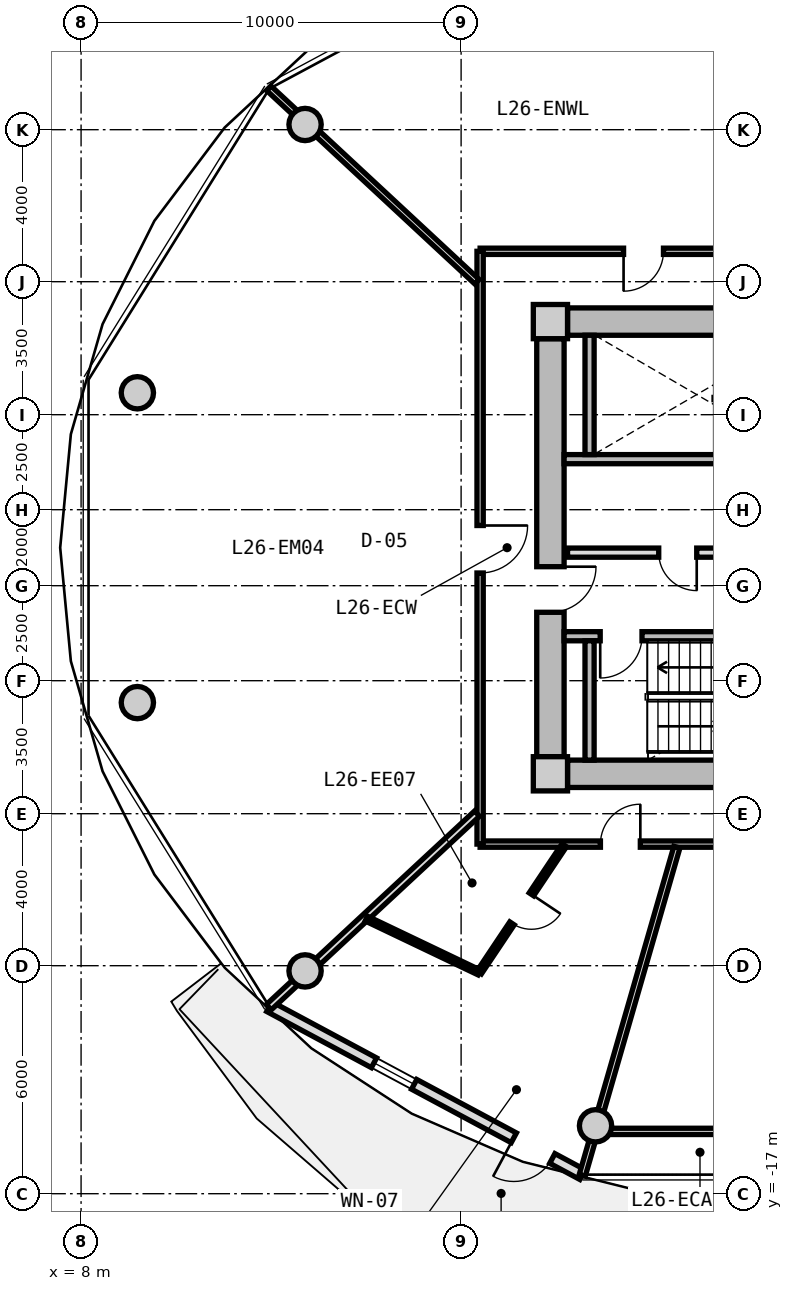
"""IFC4 building model, lengths in metres.
Left out: names, types, materials, properties, quantities, classifications, styles, units other than length and angle.
Written with IfcOpenShell. Run it as: python <this file> out.ifc"""

import sys

from ifc_helpers import new_model, si_unit, direction, frame, frame_2d, origin, origin_2d, place, context, subcontext, project, spatial, rectangle, circle, extrude, source, transform, mapped, element, fill, save


model = new_model("IFC4")
c1 = context("Model", 3, precision=1e-05, world=origin(), true_north=direction((0.0, 1.0)))
c2 = subcontext(c1, "Body", "Model", "MODEL_VIEW")
j1 = project(units=[si_unit("LENGTHUNIT", "METRE"), si_unit("PLANEANGLEUNIT", "RADIAN")], contexts=[c1])
p1 = place(None, origin())
s1 = spatial("IfcSite", under=j1, at=p1, CompositionType="ELEMENT")
p2 = place(p1, origin())
s2 = spatial("IfcBuilding", under=s1, at=p2, CompositionType="ELEMENT")
p3 = place(p2, frame((0.0, 0.0, 87.1)))
s3 = spatial("IfcBuildingStorey", under=s2, at=p3, CompositionType="ELEMENT", Elevation=87.1)
m1 = source(origin(), c2, "Body", "SweptSolid", [
    extrude(rectangle(XDim=0.9, YDim=0.9, at=origin_2d()), origin(), (0.0, 0.0, 1.0), 3.05),
])
for number, where, z_axis, x_axis in (
    (1, (20.35, -5.95, 0.0), (0.0, 0.0, 1.0), (1.0, 0.0, 0.0)),
    (2, (20.35, 5.95, 0.0), (0.0, 0.0, 1.0), (1.0, 0.0, 0.0)),
):
    element("IfcColumn", number, at=place(p3, frame(where, z_axis=z_axis, x_axis=x_axis)), inside=s3, PredefinedType="COLUMN", context=c2, shape_type="MappedRepresentation", body=[
        mapped(m1, transform((0.0, 0.0, 0.0), x_axis=(1.0, 0.0, 0.0), y_axis=(0.0, 1.0, 0.0), z_axis=(0.0, 0.0, 1.0), scale=1.0)),
    ])
m2 = source(origin(), c2, "Body", "SweptSolid", [
    extrude(rectangle(XDim=14.4, YDim=0.72, at=frame_2d((7.2, 0.0))), origin(), (0.0, 0.0, 1.0), 2.79),
])
for number, where, z_axis, x_axis in (
    (3, (20.8, 5.95, 0.0), (0.0, 0.0, 1.0), (1.0, 0.0, 0.0)),
    (4, (35.2, -5.95, 0.0), (0.0, 0.0, 1.0), (-1.0, 0.0, 0.0)),
):
    element("IfcWall", number, at=place(p3, frame(where, z_axis=z_axis, x_axis=x_axis)), inside=s3, PredefinedType="SHEAR", context=c2, shape_type="MappedRepresentation", body=[
        mapped(m2, transform((0.0, 0.0, 0.0), x_axis=(1.0, 0.0, 0.0), y_axis=(0.0, 1.0, 0.0), z_axis=(0.0, 0.0, 1.0), scale=1.0)),
    ])
m3 = source(origin(), c2, "Body", "SweptSolid", [
    extrude(rectangle(XDim=11.0, YDim=0.72, at=frame_2d((5.5, 0.0))), origin(), (0.0, 0.0, 1.0), 2.79),
])
p4 = place(p3, frame((20.35, -5.5, 0.0), z_axis=(0.0, 0.0, 1.0), x_axis=(0.0, 1.0, 0.0)))
e5 = element("IfcWall", 5, at=p4, inside=s3, PredefinedType="SHEAR", context=c2, shape_type="MappedRepresentation", body=[
    mapped(m3, transform((0.0, 0.0, 0.0), x_axis=(1.0, 0.0, 0.0), y_axis=(0.0, 1.0, 0.0), z_axis=(0.0, 0.0, 1.0), scale=1.0)),
])
p5 = place(p4, frame((3.8, 0.0, 0.0)))
e6 = element("IfcOpeningElement", 6, at=p5, cuts=e5, PredefinedType="OPENING", context=c2, shape_type="SweptSolid", body=[
    extrude(rectangle(XDim=1.2, YDim=2.15, at=frame_2d((0.6, 1.075))), frame((0.0, 0.37, 0.0), z_axis=(0.0, -1.0, 0.0), x_axis=(1.0, 0.0, 0.0)), (0.0, 0.0, 1.0), 0.74),
])
m4 = source(origin(), c2, "Body", "SweptSolid", [
    extrude(circle(Radius=0.425, at=origin_2d()), origin(), (0.0, 0.0, 1.0), 3.05),
])
for number, where, z_axis, x_axis in (
    (7, (13.894, 11.137, 0.0), (0.0, 0.0, 1.0), (1.0, 0.0, 0.0)),
    (8, (9.481, 4.076, 0.0), (0.0, 0.0, 1.0), (1.0, 0.0, 0.0)),
    (9, (9.481, -4.076, 0.0), (0.0, 0.0, 1.0), (1.0, 0.0, 0.0)),
    (10, (13.894, -11.137, 0.0), (0.0, 0.0, 1.0), (1.0, 0.0, 0.0)),
    (11, (21.537, -15.213, 0.0), (0.0, 0.0, 1.0), (1.0, 0.0, 0.0)),
):
    element("IfcColumn", number, at=place(p3, frame(where, z_axis=z_axis, x_axis=x_axis)), inside=s3, PredefinedType="COLUMN", context=c2, shape_type="MappedRepresentation", body=[
        mapped(m4, transform((0.0, 0.0, 0.0), x_axis=(1.0, 0.0, 0.0), y_axis=(0.0, 1.0, 0.0), z_axis=(0.0, 0.0, 1.0), scale=1.0)),
    ])
m5 = source(origin(), c2, "Body", "SweptSolid", [
    extrude(rectangle(XDim=9.351, YDim=0.29, at=frame_2d((4.675, 0.0))), origin(), (0.0, 0.0, 1.0), 2.79),
])
p6 = place(p3, frame((21.193, -16.498, 0.0), z_axis=(0.0, 0.0, 1.0), x_axis=(-0.881184411073, 0.472772708267, 0.0)))
e12 = element("IfcWall", 12, at=p6, inside=s3, PredefinedType="SOLIDWALL", context=c2, shape_type="MappedRepresentation", body=[
    mapped(m5, transform((0.0, 0.0, 0.0), x_axis=(1.0, 0.0, 0.0), y_axis=(0.0, 1.0, 0.0), z_axis=(0.0, 0.0, 1.0), scale=1.0)),
])
p7 = place(p6, frame((0.9, 0.0, 0.0)))
e13 = element("IfcOpeningElement", 13, at=p7, cuts=e12, PredefinedType="OPENING", context=c2, shape_type="SweptSolid", body=[
    extrude(rectangle(XDim=1.15, YDim=2.25, at=frame_2d((0.575, 1.125))), frame((0.0, 0.155, 0.0), z_axis=(0.0, -1.0, 0.0), x_axis=(1.0, 0.0, 0.0)), (0.0, 0.0, 1.0), 0.31),
])
p8 = place(p6, frame((5.025, 0.0, 0.85)))
e14 = element("IfcOpeningElement", 14, at=p8, cuts=e12, PredefinedType="OPENING", context=c2, shape_type="SweptSolid", body=[
    extrude(rectangle(XDim=1.2, YDim=1.5, at=frame_2d((0.6, 0.75))), frame((0.0, 0.155, 0.0), z_axis=(0.0, -1.0, 0.0), x_axis=(1.0, 0.0, 0.0)), (0.0, 0.0, 1.0), 0.31),
])
m6 = source(origin(), c2, "Body", "SweptSolid", [
    extrude(rectangle(XDim=7.83, YDim=0.24, at=frame_2d((3.915, 0.0))), origin(), (0.0, 0.0, 1.0), 2.79),
])
p9 = place(p3, frame((20.71, 2.33, 0.0), z_axis=(0.0, 0.0, 1.0), x_axis=(1.0, 0.0, 0.0)))
e15 = element("IfcWall", 15, at=p9, inside=s3, PredefinedType="PARTITIONING", context=c2, shape_type="MappedRepresentation", body=[
    mapped(m6, transform((0.0, 0.0, 0.0), x_axis=(1.0, 0.0, 0.0), y_axis=(0.0, 1.0, 0.0), z_axis=(0.0, 0.0, 1.0), scale=1.0)),
])
m7 = source(origin(), c2, "Body", "SweptSolid", [
    extrude(rectangle(XDim=3.14, YDim=0.24, at=frame_2d((1.57, 0.0))), origin(), (0.0, 0.0, 1.0), 2.79),
])
p10 = place(p3, frame((21.38, 2.45, 0.0), z_axis=(0.0, 0.0, 1.0), x_axis=(0.0, 1.0, 0.0)))
e16 = element("IfcWall", 16, at=p10, inside=s3, PredefinedType="PARTITIONING", context=c2, shape_type="MappedRepresentation", body=[
    mapped(m7, transform((0.0, 0.0, 0.0), x_axis=(1.0, 0.0, 0.0), y_axis=(0.0, 1.0, 0.0), z_axis=(0.0, 0.0, 1.0), scale=1.0)),
])
p11 = place(p3, frame((20.71, -2.33, 0.0), z_axis=(0.0, 0.0, 1.0), x_axis=(1.0, 0.0, 0.0)))
e17 = element("IfcWall", 17, at=p11, inside=s3, PredefinedType="PARTITIONING", context=c2, shape_type="MappedRepresentation", body=[
    mapped(m6, transform((0.0, 0.0, 0.0), x_axis=(1.0, 0.0, 0.0), y_axis=(0.0, 1.0, 0.0), z_axis=(0.0, 0.0, 1.0), scale=1.0)),
])
p12 = place(p11, frame((0.95, 0.0, 0.0)))
e18 = element("IfcOpeningElement", 18, at=p12, cuts=e17, PredefinedType="OPENING", context=c2, shape_type="SweptSolid", body=[
    extrude(rectangle(XDim=1.1, YDim=2.15, at=frame_2d((0.55, 1.075))), frame((0.0, 0.13, 0.0), z_axis=(0.0, -1.0, 0.0), x_axis=(1.0, 0.0, 0.0)), (0.0, 0.0, 1.0), 0.26),
])
p13 = place(p3, frame((21.38, -5.59, 0.0), z_axis=(0.0, 0.0, 1.0), x_axis=(0.0, 1.0, 0.0)))
e19 = element("IfcWall", 19, at=p13, inside=s3, PredefinedType="PARTITIONING", context=c2, shape_type="MappedRepresentation", body=[
    mapped(m7, transform((0.0, 0.0, 0.0), x_axis=(1.0, 0.0, 0.0), y_axis=(0.0, 1.0, 0.0), z_axis=(0.0, 0.0, 1.0), scale=1.0)),
])
m8 = source(origin(), c2, "Body", "SweptSolid", [
    extrude(rectangle(XDim=7.62, YDim=0.24, at=frame_2d((3.81, 0.0))), origin(), (0.0, 0.0, 1.0), 2.775),
])
p14 = place(p3, frame((20.8, -0.13, 0.0), z_axis=(0.0, 0.0, 1.0), x_axis=(1.0, 0.0, 0.0)))
e20 = element("IfcWall", 20, at=p14, inside=s3, PredefinedType="PARTITIONING", context=c2, shape_type="MappedRepresentation", body=[
    mapped(m8, transform((0.0, 0.0, 0.0), x_axis=(1.0, 0.0, 0.0), y_axis=(0.0, 1.0, 0.0), z_axis=(0.0, 0.0, 1.0), scale=1.0)),
])
p15 = place(p14, frame((6.22, 0.0, 0.0)))
e21 = element("IfcOpeningElement", 21, at=p15, cuts=e20, PredefinedType="OPENING", context=c2, shape_type="SweptSolid", body=[
    extrude(rectangle(XDim=1.0, YDim=2.1, at=frame_2d((0.5, 1.05))), frame((0.0, 0.13, 0.0), z_axis=(0.0, -1.0, 0.0), x_axis=(1.0, 0.0, 0.0)), (0.0, 0.0, 1.0), 0.26),
])
p16 = place(p14, frame((2.4, 0.0, 0.0)))
e22 = element("IfcOpeningElement", 22, at=p16, cuts=e20, PredefinedType="OPENING", context=c2, shape_type="SweptSolid", body=[
    extrude(rectangle(XDim=1.0, YDim=2.1, at=frame_2d((0.5, 1.05))), frame((0.0, 0.13, 0.0), z_axis=(0.0, -1.0, 0.0), x_axis=(1.0, 0.0, 0.0)), (0.0, 0.0, 1.0), 0.26),
])
m9 = source(origin(), c2, "Body", "SweptSolid", [
    extrude(rectangle(XDim=8.6, YDim=0.165, at=frame_2d((4.3, 0.0))), origin(), (0.0, 0.0, 1.0), 2.775),
])
p17 = place(p3, frame((18.5, 7.8, 0.0), z_axis=(0.0, 0.0, 1.0), x_axis=(1.0, 0.0, 0.0)))
e23 = element("IfcWall", 23, at=p17, inside=s3, PredefinedType="PARTITIONING", context=c2, shape_type="MappedRepresentation", body=[
    mapped(m9, transform((0.0, 0.0, 0.0), x_axis=(1.0, 0.0, 0.0), y_axis=(0.0, 1.0, 0.0), z_axis=(0.0, 0.0, 1.0), scale=1.0)),
])
p18 = place(p17, frame((3.775, 0.0, 0.0)))
e24 = element("IfcOpeningElement", 24, at=p18, cuts=e23, PredefinedType="OPENING", context=c2, shape_type="SweptSolid", body=[
    extrude(rectangle(XDim=1.05, YDim=2.15, at=frame_2d((0.525, 1.075))), frame((0.0, 0.093, 0.0), z_axis=(0.0, -1.0, 0.0), x_axis=(1.0, 0.0, 0.0)), (0.0, 0.0, 1.0), 0.185),
])
p19 = place(p3, frame((27.1, -7.8, 0.0), z_axis=(0.0, 0.0, 1.0), x_axis=(-1.0, 0.0, 0.0)))
e25 = element("IfcWall", 25, at=p19, inside=s3, PredefinedType="PARTITIONING", context=c2, shape_type="MappedRepresentation", body=[
    mapped(m9, transform((0.0, 0.0, 0.0), x_axis=(1.0, 0.0, 0.0), y_axis=(0.0, 1.0, 0.0), z_axis=(0.0, 0.0, 1.0), scale=1.0)),
])
p20 = place(p19, frame((4.384, 0.0, 0.0)))
e26 = element("IfcOpeningElement", 26, at=p20, cuts=e25, PredefinedType="OPENING", context=c2, shape_type="SweptSolid", body=[
    extrude(rectangle(XDim=1.05, YDim=2.15, at=frame_2d((0.525, 1.075))), frame((0.0, 0.093, 0.0), z_axis=(0.0, -1.0, 0.0), x_axis=(1.0, 0.0, 0.0)), (0.0, 0.0, 1.0), 0.185),
])
m10 = source(origin(), c2, "Body", "SweptSolid", [
    extrude(rectangle(XDim=15.6, YDim=0.165, at=frame_2d((7.8, 0.0))), origin(), (0.0, 0.0, 1.0), 2.775),
])
p21 = place(p3, frame((18.5, -7.8, 0.0), z_axis=(0.0, 0.0, 1.0), x_axis=(0.0, 1.0, 0.0)))
e27 = element("IfcWall", 27, at=p21, inside=s3, PredefinedType="PARTITIONING", context=c2, shape_type="MappedRepresentation", body=[
    mapped(m10, transform((0.0, 0.0, 0.0), x_axis=(1.0, 0.0, 0.0), y_axis=(0.0, 1.0, 0.0), z_axis=(0.0, 0.0, 1.0), scale=1.0)),
])
p22 = place(p21, frame((7.134, 0.0, 0.0)))
e28 = element("IfcOpeningElement", 28, at=p22, cuts=e27, PredefinedType="OPENING", context=c2, shape_type="SweptSolid", body=[
    extrude(rectangle(XDim=1.25, YDim=2.2, at=frame_2d((0.625, 1.1))), frame((0.0, 0.093, 0.0), z_axis=(0.0, -1.0, 0.0), x_axis=(1.0, 0.0, 0.0)), (0.0, 0.0, 1.0), 0.185),
])
m11 = source(origin(), c2, "Body", "SweptSolid", [
    extrude(rectangle(XDim=7.482, YDim=0.165, at=frame_2d((3.741, 0.0))), origin(), (0.0, 0.0, 1.0), 2.275),
])
p23 = place(p3, frame((18.42, 6.998, 0.0), z_axis=(0.0, 0.0, 1.0), x_axis=(-0.732508698043, 0.680757671489, 0.0)))
e29 = element("IfcWall", 29, at=p23, inside=s3, PredefinedType="PARTITIONING", context=c2, shape_type="MappedRepresentation", body=[
    mapped(m11, transform((0.0, 0.0, 0.0), x_axis=(1.0, 0.0, 0.0), y_axis=(0.0, 1.0, 0.0), z_axis=(0.0, 0.0, 1.0), scale=1.0)),
])
m12 = source(origin(), c2, "Body", "SweptSolid", [
    extrude(rectangle(XDim=8.989, YDim=0.165, at=frame_2d((4.495, 0.0))), origin(), (0.0, 0.0, 1.0), 2.275),
])
p24 = place(p3, frame((23.678, -7.88, 0.0), z_axis=(0.0, 0.0, 1.0), x_axis=(-0.27702323008, -0.960863221274, 0.0)))
e30 = element("IfcWall", 30, at=p24, inside=s3, PredefinedType="PARTITIONING", context=c2, shape_type="MappedRepresentation", body=[
    mapped(m12, transform((0.0, 0.0, 0.0), x_axis=(1.0, 0.0, 0.0), y_axis=(0.0, 1.0, 0.0), z_axis=(0.0, 0.0, 1.0), scale=1.0)),
])
m13 = source(origin(), c2, "Body", "SweptSolid", [
    extrude(rectangle(XDim=5.814, YDim=0.165, at=frame_2d((2.907, 0.0))), origin(), (0.0, 0.0, 1.0), 2.275),
])
p25 = place(p3, frame((21.366, -15.36, 0.0), z_axis=(0.0, 0.0, 1.0), x_axis=(1.0, 0.0, 0.0)))
e31 = element("IfcWall", 31, at=p25, inside=s3, PredefinedType="PARTITIONING", context=c2, shape_type="MappedRepresentation", body=[
    mapped(m13, transform((0.0, 0.0, 0.0), x_axis=(1.0, 0.0, 0.0), y_axis=(0.0, 1.0, 0.0), z_axis=(0.0, 0.0, 1.0), scale=1.0)),
])
m14 = source(origin(), c2, "Body", "SweptSolid", [
    extrude(rectangle(XDim=7.482, YDim=0.19, at=frame_2d((3.741, 0.0))), origin(), (0.0, 0.0, 1.0), 2.275),
])
p26 = place(p3, frame((18.42, -6.998, 0.0), z_axis=(0.0, 0.0, 1.0), x_axis=(-0.732508698043, -0.680757671489, 0.0)))
e32 = element("IfcWall", 32, at=p26, inside=s3, PredefinedType="PARTITIONING", context=c2, shape_type="MappedRepresentation", body=[
    mapped(m14, transform((0.0, 0.0, 0.0), x_axis=(1.0, 0.0, 0.0), y_axis=(0.0, 1.0, 0.0), z_axis=(0.0, 0.0, 1.0), scale=1.0)),
])
m15 = source(origin(), c2, "Body", "SweptSolid", [
    extrude(rectangle(XDim=4.027, YDim=0.14, at=frame_2d((2.014, 0.0))), origin(), (0.0, 0.0, 1.0), 2.775),
])
p27 = place(p3, frame((20.714, -7.83, 0.0), z_axis=(0.0, 0.0, 1.0), x_axis=(-0.555832825922, -0.831294093343, 0.0)))
e33 = element("IfcWall", 33, at=p27, inside=s3, PredefinedType="PARTITIONING", context=c2, shape_type="MappedRepresentation", body=[
    mapped(m15, transform((0.0, 0.0, 0.0), x_axis=(1.0, 0.0, 0.0), y_axis=(0.0, 1.0, 0.0), z_axis=(0.0, 0.0, 1.0), scale=1.0)),
])
p28 = place(p27, frame((1.554, 0.0, 0.0)))
e34 = element("IfcOpeningElement", 34, at=p28, cuts=e33, PredefinedType="OPENING", context=c2, shape_type="SweptSolid", body=[
    extrude(rectangle(XDim=0.92, YDim=2.1, at=frame_2d((0.46, 1.05))), frame((0.0, 0.08, 0.0), z_axis=(0.0, -1.0, 0.0), x_axis=(1.0, 0.0, 0.0)), (0.0, 0.0, 1.0), 0.16),
])
m16 = source(origin(), c2, "Body", "SweptSolid", [
    extrude(rectangle(XDim=3.291, YDim=0.14, at=frame_2d((1.646, 0.0))), origin(), (0.0, 0.0, 1.0), 2.775),
])
p29 = place(p3, frame((18.476, -11.178, 0.0), z_axis=(0.0, 0.0, 1.0), x_axis=(-0.902381393443, 0.430938302739, 0.0)))
e35 = element("IfcWall", 35, at=p29, inside=s3, PredefinedType="PARTITIONING", context=c2, shape_type="MappedRepresentation", body=[
    mapped(m16, transform((0.0, 0.0, 0.0), x_axis=(1.0, 0.0, 0.0), y_axis=(0.0, 1.0, 0.0), z_axis=(0.0, 0.0, 1.0), scale=1.0)),
])
m17 = source(origin(), c2, "Body", "SweptSolid", [
    extrude(rectangle(XDim=1.15, YDim=2.25, at=frame_2d((0.575, 1.125))), frame((0.0, 0.025, 0.0), z_axis=(0.0, -1.0, 0.0), x_axis=(1.0, 0.0, 0.0)), (0.0, 0.0, 1.0), 0.05),
])
p30 = place(p7, origin())
e36 = element("IfcDoor", 36, at=p30, inside=s3, OperationType="SINGLE_SWING_RIGHT", PredefinedType="DOOR", context=c2, shape_type="MappedRepresentation", body=[
    mapped(m17, transform((0.0, 0.0, 0.0), x_axis=(1.0, 0.0, 0.0), y_axis=(0.0, 1.0, 0.0), z_axis=(0.0, 0.0, 1.0), scale=1.0)),
])
fill(e13, e36)
m18 = source(origin(), c2, "Body", "SweptSolid", [
    extrude(rectangle(XDim=1.2, YDim=1.5, at=frame_2d((0.6, 0.75))), frame((0.0, 0.03, 0.0), z_axis=(0.0, -1.0, 0.0), x_axis=(1.0, 0.0, 0.0)), (0.0, 0.0, 1.0), 0.06),
])
p31 = place(p8, origin())
e37 = element("IfcWindow", 37, at=p31, inside=s3, PartitioningType="SINGLE_PANEL", PredefinedType="WINDOW", context=c2, shape_type="MappedRepresentation", body=[
    mapped(m18, transform((0.0, 0.0, 0.0), x_axis=(1.0, 0.0, 0.0), y_axis=(0.0, 1.0, 0.0), z_axis=(0.0, 0.0, 1.0), scale=1.0)),
])
fill(e14, e37)
m19 = source(origin(), c2, "Body", "SweptSolid", [
    extrude(rectangle(XDim=1.1, YDim=2.15, at=frame_2d((0.55, 1.075))), frame((0.0, 0.025, 0.0), z_axis=(0.0, -1.0, 0.0), x_axis=(1.0, 0.0, 0.0)), (0.0, 0.0, 1.0), 0.05),
])
p32 = place(p12, frame((1.1, 0.0, 0.0), z_axis=(0.0, 0.0, 1.0), x_axis=(-1.0, 0.0, 0.0)))
e38 = element("IfcDoor", 38, at=p32, inside=s3, OperationType="SINGLE_SWING_RIGHT", PredefinedType="DOOR", context=c2, shape_type="MappedRepresentation", body=[
    mapped(m19, transform((0.0, 0.0, 0.0), x_axis=(1.0, 0.0, 0.0), y_axis=(0.0, 1.0, 0.0), z_axis=(0.0, 0.0, 1.0), scale=1.0)),
])
fill(e18, e38)
m20 = source(origin(), c2, "Body", "SweptSolid", [
    extrude(rectangle(XDim=1.2, YDim=2.15, at=frame_2d((0.6, 1.075))), frame((0.0, 0.025, 0.0), z_axis=(0.0, -1.0, 0.0), x_axis=(1.0, 0.0, 0.0)), (0.0, 0.0, 1.0), 0.05),
])
p33 = place(p5, frame((1.2, 0.0, 0.0), z_axis=(0.0, 0.0, 1.0), x_axis=(-1.0, 0.0, 0.0)))
e39 = element("IfcDoor", 39, at=p33, inside=s3, OperationType="SINGLE_SWING_LEFT", PredefinedType="DOOR", context=c2, shape_type="MappedRepresentation", body=[
    mapped(m20, transform((0.0, 0.0, 0.0), x_axis=(1.0, 0.0, 0.0), y_axis=(0.0, 1.0, 0.0), z_axis=(0.0, 0.0, 1.0), scale=1.0)),
])
fill(e6, e39)
m21 = source(origin(), c2, "Body", "SweptSolid", [
    extrude(rectangle(XDim=1.0, YDim=2.1, at=frame_2d((0.5, 1.05))), frame((0.0, 0.025, 0.0), z_axis=(0.0, -1.0, 0.0), x_axis=(1.0, 0.0, 0.0)), (0.0, 0.0, 1.0), 0.05),
])
p34 = place(p16, frame((1.0, 0.0, 0.0), z_axis=(0.0, 0.0, 1.0), x_axis=(-1.0, 0.0, 0.0)))
e40 = element("IfcDoor", 40, at=p34, inside=s3, OperationType="SINGLE_SWING_LEFT", PredefinedType="DOOR", context=c2, shape_type="MappedRepresentation", body=[
    mapped(m21, transform((0.0, 0.0, 0.0), x_axis=(1.0, 0.0, 0.0), y_axis=(0.0, 1.0, 0.0), z_axis=(0.0, 0.0, 1.0), scale=1.0)),
])
fill(e22, e40)
m22 = source(origin(), c2, "Body", "SweptSolid", [
    extrude(rectangle(XDim=1.05, YDim=2.15, at=frame_2d((0.525, 1.075))), frame((0.0, 0.025, 0.0), z_axis=(0.0, -1.0, 0.0), x_axis=(1.0, 0.0, 0.0)), (0.0, 0.0, 1.0), 0.05),
])
p35 = place(p18, frame((1.05, 0.0, 0.0), z_axis=(0.0, 0.0, 1.0), x_axis=(-1.0, 0.0, 0.0)))
e41 = element("IfcDoor", 41, at=p35, inside=s3, OperationType="SINGLE_SWING_RIGHT", PredefinedType="DOOR", context=c2, shape_type="MappedRepresentation", body=[
    mapped(m22, transform((0.0, 0.0, 0.0), x_axis=(1.0, 0.0, 0.0), y_axis=(0.0, 1.0, 0.0), z_axis=(0.0, 0.0, 1.0), scale=1.0)),
])
fill(e24, e41)
m23 = source(origin(), c2, "Body", "SweptSolid", [
    extrude(rectangle(XDim=1.25, YDim=2.2, at=frame_2d((0.625, 1.1))), frame((0.0, 0.025, 0.0), z_axis=(0.0, -1.0, 0.0), x_axis=(1.0, 0.0, 0.0)), (0.0, 0.0, 1.0), 0.05),
])
p36 = place(p22, frame((1.25, 0.0, 0.0), z_axis=(0.0, 0.0, 1.0), x_axis=(-1.0, 0.0, 0.0)))
e42 = element("IfcDoor", 42, at=p36, inside=s3, OperationType="SINGLE_SWING_LEFT", PredefinedType="DOOR", context=c2, shape_type="MappedRepresentation", body=[
    mapped(m23, transform((0.0, 0.0, 0.0), x_axis=(1.0, 0.0, 0.0), y_axis=(0.0, 1.0, 0.0), z_axis=(0.0, 0.0, 1.0), scale=1.0)),
])
fill(e28, e42)
p37 = place(p20, frame((1.05, 0.0, 0.0), z_axis=(0.0, 0.0, 1.0), x_axis=(-1.0, 0.0, 0.0)))
e43 = element("IfcDoor", 43, at=p37, inside=s3, OperationType="SINGLE_SWING_RIGHT", PredefinedType="DOOR", context=c2, shape_type="MappedRepresentation", body=[
    mapped(m22, transform((0.0, 0.0, 0.0), x_axis=(1.0, 0.0, 0.0), y_axis=(0.0, 1.0, 0.0), z_axis=(0.0, 0.0, 1.0), scale=1.0)),
])
fill(e26, e43)
m24 = source(origin(), c2, "Body", "SweptSolid", [
    extrude(rectangle(XDim=0.92, YDim=2.1, at=frame_2d((0.46, 1.05))), frame((0.0, 0.025, 0.0), z_axis=(0.0, -1.0, 0.0), x_axis=(1.0, 0.0, 0.0)), (0.0, 0.0, 1.0), 0.05),
])
p38 = place(p28, origin())
e44 = element("IfcDoor", 44, at=p38, inside=s3, OperationType="SINGLE_SWING_LEFT", PredefinedType="DOOR", context=c2, shape_type="MappedRepresentation", body=[
    mapped(m24, transform((0.0, 0.0, 0.0), x_axis=(1.0, 0.0, 0.0), y_axis=(0.0, 1.0, 0.0), z_axis=(0.0, 0.0, 1.0), scale=1.0)),
])
fill(e34, e44)
save(model, sys.argv[1])
